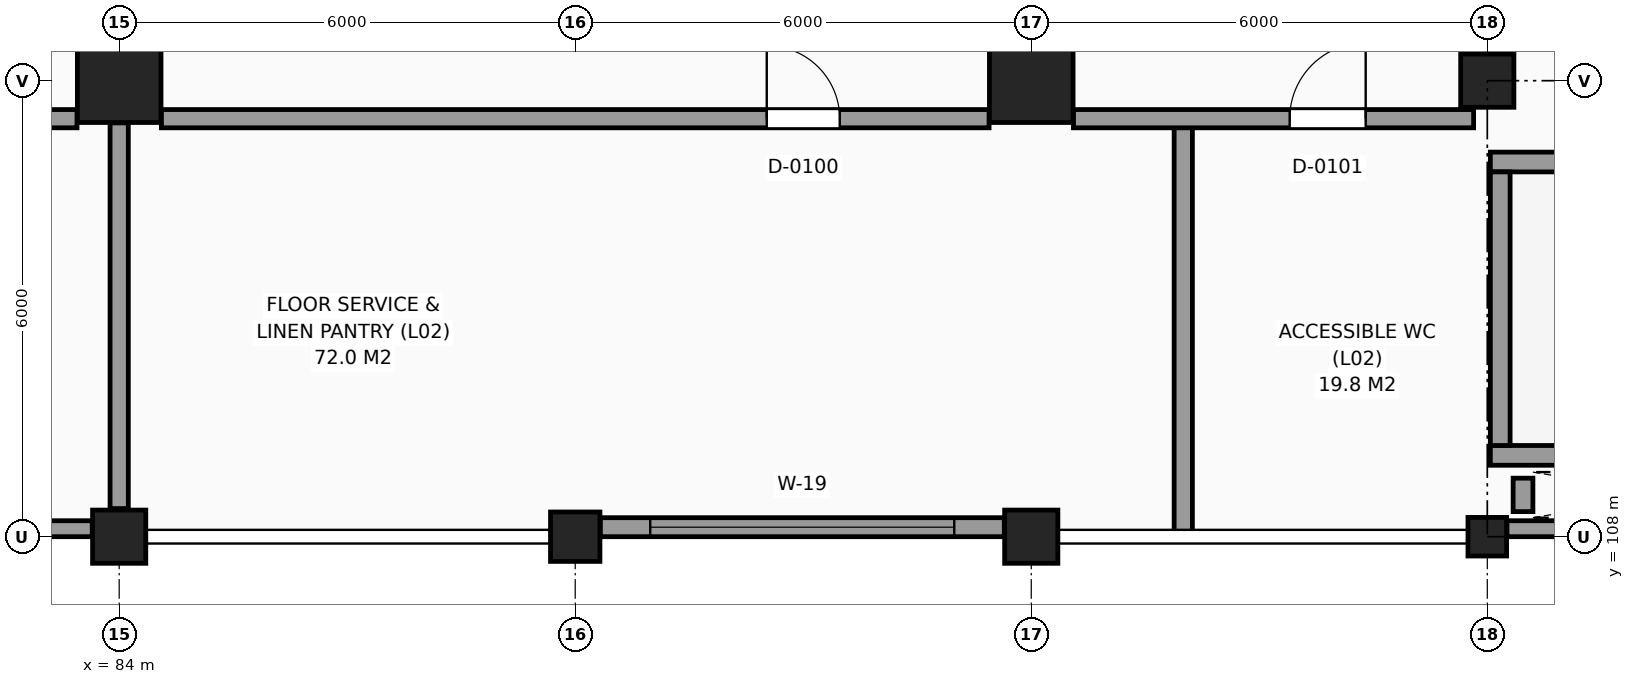
"""IFC4 building model, lengths in metres.
Left out: names, types, materials, properties, quantities, classifications, styles, units other than length and angle.
Written with IfcOpenShell. Run it as: python <this file> out.ifc"""

import sys

from ifc_helpers import new_model, si_unit, direction, frame, frame_2d, origin, origin_2d, place, context, subcontext, project, spatial, rectangle, circle, hollow_circle, extrude, element, fill, save


model = new_model("IFC4")
c1 = context("Model", 3, precision=1e-05, world=origin(), true_north=direction((0.0, 1.0)))
c2 = subcontext(c1, "Body", "Model", "MODEL_VIEW")
j1 = project(units=[si_unit("LENGTHUNIT", "METRE"), si_unit("PLANEANGLEUNIT", "RADIAN")], contexts=[c1])
p1 = place(None, origin())
s1 = spatial("IfcSite", under=j1, at=p1, CompositionType="ELEMENT")
p2 = place(p1, origin())
s2 = spatial("IfcBuilding", under=s1, at=p2, CompositionType="ELEMENT")
p3 = place(p2, frame((0.0, 0.0, 10.5)))
s3 = spatial("IfcBuildingStorey", under=s2, at=p3, CompositionType="ELEMENT", Elevation=10.5)
p4 = place(p3, frame((84.0, 108.0, 0.0), z_axis=(0.0, 0.0, 1.0), x_axis=(1.0, 0.0, 0.0)))
e1 = element("IfcColumn", 1, at=p4, inside=s3, PredefinedType="COLUMN", context=c2, shape_type="SweptSolid", body=[
    extrude(rectangle(XDim=0.7, YDim=0.7, at=origin_2d()), origin(), (0.0, 0.0, 1.0), 4.5),
])
p5 = place(p3, frame((84.0, 114.0, 0.0), z_axis=(0.0, 0.0, 1.0), x_axis=(1.0, 0.0, 0.0)))
e2 = element("IfcColumn", 2, at=p5, inside=s3, PredefinedType="COLUMN", context=c2, shape_type="SweptSolid", body=[
    extrude(rectangle(XDim=1.1, YDim=1.1, at=origin_2d()), origin(), (0.0, 0.0, 1.0), 4.5),
])
p6 = place(p3, frame((90.0, 108.0, 0.0), z_axis=(0.0, 0.0, 1.0), x_axis=(1.0, 0.0, 0.0)))
e3 = element("IfcColumn", 3, at=p6, inside=s3, PredefinedType="COLUMN", context=c2, shape_type="SweptSolid", body=[
    extrude(rectangle(XDim=0.65, YDim=0.65, at=origin_2d()), origin(), (0.0, 0.0, 1.0), 4.5),
])
p7 = place(p3, frame((96.0, 108.0, 0.0), z_axis=(0.0, 0.0, 1.0), x_axis=(1.0, 0.0, 0.0)))
e4 = element("IfcColumn", 4, at=p7, inside=s3, PredefinedType="COLUMN", context=c2, shape_type="SweptSolid", body=[
    extrude(circle(Radius=0.35, at=origin_2d()), origin(), (0.0, 0.0, 1.0), 4.5),
])
p8 = place(p3, frame((96.0, 114.0, 0.0), z_axis=(0.0, 0.0, 1.0), x_axis=(1.0, 0.0, 0.0)))
e5 = element("IfcColumn", 5, at=p8, inside=s3, PredefinedType="COLUMN", context=c2, shape_type="SweptSolid", body=[
    extrude(rectangle(XDim=1.1, YDim=1.1, at=origin_2d()), origin(), (0.0, 0.0, 1.0), 4.5),
])
p9 = place(p3, frame((102.0, 108.0, 0.0), z_axis=(0.0, 0.0, 1.0), x_axis=(1.0, 0.0, 0.0)))
e6 = element("IfcColumn", 6, at=p9, inside=s3, PredefinedType="COLUMN", context=c2, shape_type="SweptSolid", body=[
    extrude(hollow_circle(Radius=0.254, WallThickness=0.025, at=origin_2d()), origin(), (0.0, 0.0, 1.0), 4.5),
])
p10 = place(p3, frame((102.0, 114.0, 0.0), z_axis=(0.0, 0.0, 1.0), x_axis=(1.0, 0.0, 0.0)))
e7 = element("IfcColumn", 7, at=p10, inside=s3, PredefinedType="COLUMN", context=c2, shape_type="SweptSolid", body=[
    extrude(rectangle(XDim=0.7, YDim=0.7, at=origin_2d()), origin(), (0.0, 0.0, 1.0), 4.5),
])
p11 = place(p3, frame((78.259, 108.105, 0.0), z_axis=(0.0, 0.0, 1.0), x_axis=(1.0, 0.0, 0.0)))
e8 = element("IfcWall", 8, at=p11, inside=s3, PredefinedType="SOLIDWALL", context=c2, shape_type="SweptSolid", body=[
    extrude(rectangle(XDim=5.386, YDim=0.21, at=frame_2d((2.693, 0.0))), origin(), (0.0, 0.0, 1.0), 3.49),
])
p12 = place(p3, frame((90.33, 108.125, 0.0), z_axis=(0.0, 0.0, 1.0), x_axis=(1.0, 0.0, 0.0)))
e9 = element("IfcWall", 9, at=p12, inside=s3, PredefinedType="SOLIDWALL", context=c2, shape_type="SweptSolid", body=[
    extrude(rectangle(XDim=5.315, YDim=0.25, at=frame_2d((2.657, 0.0))), origin(), (0.0, 0.0, 1.0), 3.49),
])
p13 = place(p12, frame((0.657, 0.0, 0.85)))
e10 = element("IfcOpeningElement", 10, at=p13, cuts=e9, PredefinedType="OPENING", context=c2, shape_type="SweptSolid", body=[
    extrude(rectangle(XDim=4.0, YDim=1.3, at=frame_2d((2.0, 0.65))), frame((0.0, 0.135, 0.0), z_axis=(0.0, -1.0, 0.0), x_axis=(1.0, 0.0, 0.0)), (0.0, 0.0, 1.0), 0.27),
])
p14 = place(p3, frame((102.259, 108.105, 0.0), z_axis=(0.0, 0.0, 1.0), x_axis=(1.0, 0.0, 0.0)))
e11 = element("IfcWall", 11, at=p14, inside=s3, PredefinedType="SOLIDWALL", context=c2, shape_type="SweptSolid", body=[
    extrude(rectangle(XDim=5.386, YDim=0.21, at=frame_2d((2.693, 0.0))), origin(), (0.0, 0.0, 1.0), 4.24),
])
for number, where, z_axis, x_axis in (
    (12, (102.04, 109.07, 0.0), (0.0, 0.0, 1.0), (1.0, 0.0, 0.0)),
    (13, (102.04, 112.93, 0.0), (0.0, 0.0, 1.0), (1.0, 0.0, 0.0)),
):
    element("IfcWall", number, at=place(p3, frame(where, z_axis=z_axis, x_axis=x_axis)), inside=s3, PredefinedType="SHEAR", context=c2, shape_type="SweptSolid", body=[
        extrude(rectangle(XDim=10.72, YDim=0.26, at=frame_2d((5.36, 0.0))), origin(), (0.0, 0.0, 1.0), 4.5),
    ])
p15 = place(p3, frame((102.17, 109.2, 0.0), z_axis=(0.0, 0.0, 1.0), x_axis=(0.0, 1.0, 0.0)))
e14 = element("IfcWall", 14, at=p15, inside=s3, PredefinedType="SHEAR", context=c2, shape_type="SweptSolid", body=[
    extrude(rectangle(XDim=3.6, YDim=0.26, at=frame_2d((1.8, 0.0))), origin(), (0.0, 0.0, 1.0), 4.5),
])
p16 = place(p3, frame((102.47, 108.33, 0.0), z_axis=(0.0, 0.0, 1.0), x_axis=(0.0, 1.0, 0.0)))
e15 = element("IfcWall", 15, at=p16, inside=s3, PredefinedType="SHEAR", context=c2, shape_type="SweptSolid", body=[
    extrude(rectangle(XDim=0.44, YDim=0.26, at=frame_2d((0.22, 0.0))), origin(), (0.0, 0.0, 1.0), 4.5),
])
p17 = place(p3, frame((84.0, 108.37, 0.0), z_axis=(0.0, 0.0, 1.0), x_axis=(0.0, 1.0, 0.0)))
e16 = element("IfcWall", 16, at=p17, inside=s3, PredefinedType="PARTITIONING", context=c2, shape_type="SweptSolid", body=[
    extrude(rectangle(XDim=5.075, YDim=0.24, at=frame_2d((2.538, 0.0))), origin(), (0.0, 0.0, 1.0), 3.54),
])
p18 = place(p3, frame((98.0, 108.045, 0.0), z_axis=(0.0, 0.0, 1.0), x_axis=(0.0, 1.0, 0.0)))
e17 = element("IfcWall", 17, at=p18, inside=s3, PredefinedType="PARTITIONING", context=c2, shape_type="SweptSolid", body=[
    extrude(rectangle(XDim=5.455, YDim=0.24, at=frame_2d((2.728, 0.0))), origin(), (0.0, 0.0, 1.0), 4.24),
])
p19 = place(p3, frame((76.75, 113.5, 0.0), z_axis=(0.0, 0.0, 1.0), x_axis=(1.0, 0.0, 0.0)))
e18 = element("IfcWall", 18, at=p19, inside=s3, PredefinedType="PARTITIONING", context=c2, shape_type="SweptSolid", body=[
    extrude(rectangle(XDim=6.695, YDim=0.24, at=frame_2d((3.348, 0.0))), origin(), (0.0, 0.0, 1.0), 4.24),
])
p20 = place(p19, frame((3.25, 0.0, 0.0)))
e19 = element("IfcOpeningElement", 19, at=p20, cuts=e18, PredefinedType="OPENING", context=c2, shape_type="SweptSolid", body=[
    extrude(rectangle(XDim=1.1, YDim=2.15, at=frame_2d((0.55, 1.075))), frame((0.0, 0.13, 0.0), z_axis=(0.0, -1.0, 0.0), x_axis=(1.0, 0.0, 0.0)), (0.0, 0.0, 1.0), 0.26),
])
p21 = place(p3, frame((84.555, 113.5, 0.0), z_axis=(0.0, 0.0, 1.0), x_axis=(1.0, 0.0, 0.0)))
e20 = element("IfcWall", 20, at=p21, inside=s3, PredefinedType="PARTITIONING", context=c2, shape_type="SweptSolid", body=[
    extrude(rectangle(XDim=10.89, YDim=0.24, at=frame_2d((5.445, 0.0))), origin(), (0.0, 0.0, 1.0), 4.24),
])
p22 = place(p21, frame((7.965, 0.0, 0.0)))
e21 = element("IfcOpeningElement", 21, at=p22, cuts=e20, PredefinedType="OPENING", context=c2, shape_type="SweptSolid", body=[
    extrude(rectangle(XDim=0.96, YDim=2.15, at=frame_2d((0.48, 1.075))), frame((0.0, 0.13, 0.0), z_axis=(0.0, -1.0, 0.0), x_axis=(1.0, 0.0, 0.0)), (0.0, 0.0, 1.0), 0.26),
])
p23 = place(p3, frame((96.555, 113.5, 0.0), z_axis=(0.0, 0.0, 1.0), x_axis=(1.0, 0.0, 0.0)))
e22 = element("IfcWall", 22, at=p23, inside=s3, PredefinedType="PARTITIONING", context=c2, shape_type="SweptSolid", body=[
    extrude(rectangle(XDim=5.265, YDim=0.24, at=frame_2d((2.633, 0.0))), origin(), (0.0, 0.0, 1.0), 4.24),
])
p24 = place(p23, frame((2.845, 0.0, 0.0)))
e23 = element("IfcOpeningElement", 23, at=p24, cuts=e22, PredefinedType="OPENING", context=c2, shape_type="SweptSolid", body=[
    extrude(rectangle(XDim=1.0, YDim=2.15, at=frame_2d((0.5, 1.075))), frame((0.0, 0.13, 0.0), z_axis=(0.0, -1.0, 0.0), x_axis=(1.0, 0.0, 0.0)), (0.0, 0.0, 1.0), 0.26),
])
p25 = place(p13, origin())
e24 = element("IfcWindow", 24, at=p25, inside=s3, PartitioningType="SINGLE_PANEL", PredefinedType="WINDOW", context=c2, shape_type="SweptSolid", body=[
    extrude(rectangle(XDim=4.0, YDim=1.3, at=frame_2d((2.0, 0.65))), frame((0.0, 0.03, 0.0), z_axis=(0.0, -1.0, 0.0), x_axis=(1.0, 0.0, 0.0)), (0.0, 0.0, 1.0), 0.06),
])
fill(e10, e24)
p26 = place(p22, origin())
e25 = element("IfcDoor", 25, at=p26, inside=s3, OperationType="SINGLE_SWING_LEFT", PredefinedType="DOOR", context=c2, shape_type="SweptSolid", body=[
    extrude(rectangle(XDim=0.96, YDim=2.15, at=frame_2d((0.48, 1.075))), frame((0.0, 0.025, 0.0), z_axis=(0.0, -1.0, 0.0), x_axis=(1.0, 0.0, 0.0)), (0.0, 0.0, 1.0), 0.05),
])
fill(e21, e25)
p27 = place(p24, origin())
e26 = element("IfcDoor", 26, at=p27, inside=s3, OperationType="SINGLE_SWING_RIGHT", PredefinedType="DOOR", context=c2, shape_type="SweptSolid", body=[
    extrude(rectangle(XDim=1.0, YDim=2.15, at=frame_2d((0.5, 1.075))), frame((0.0, 0.025, 0.0), z_axis=(0.0, -1.0, 0.0), x_axis=(1.0, 0.0, 0.0)), (0.0, 0.0, 1.0), 0.05),
])
fill(e23, e26)
save(model, sys.argv[1])
